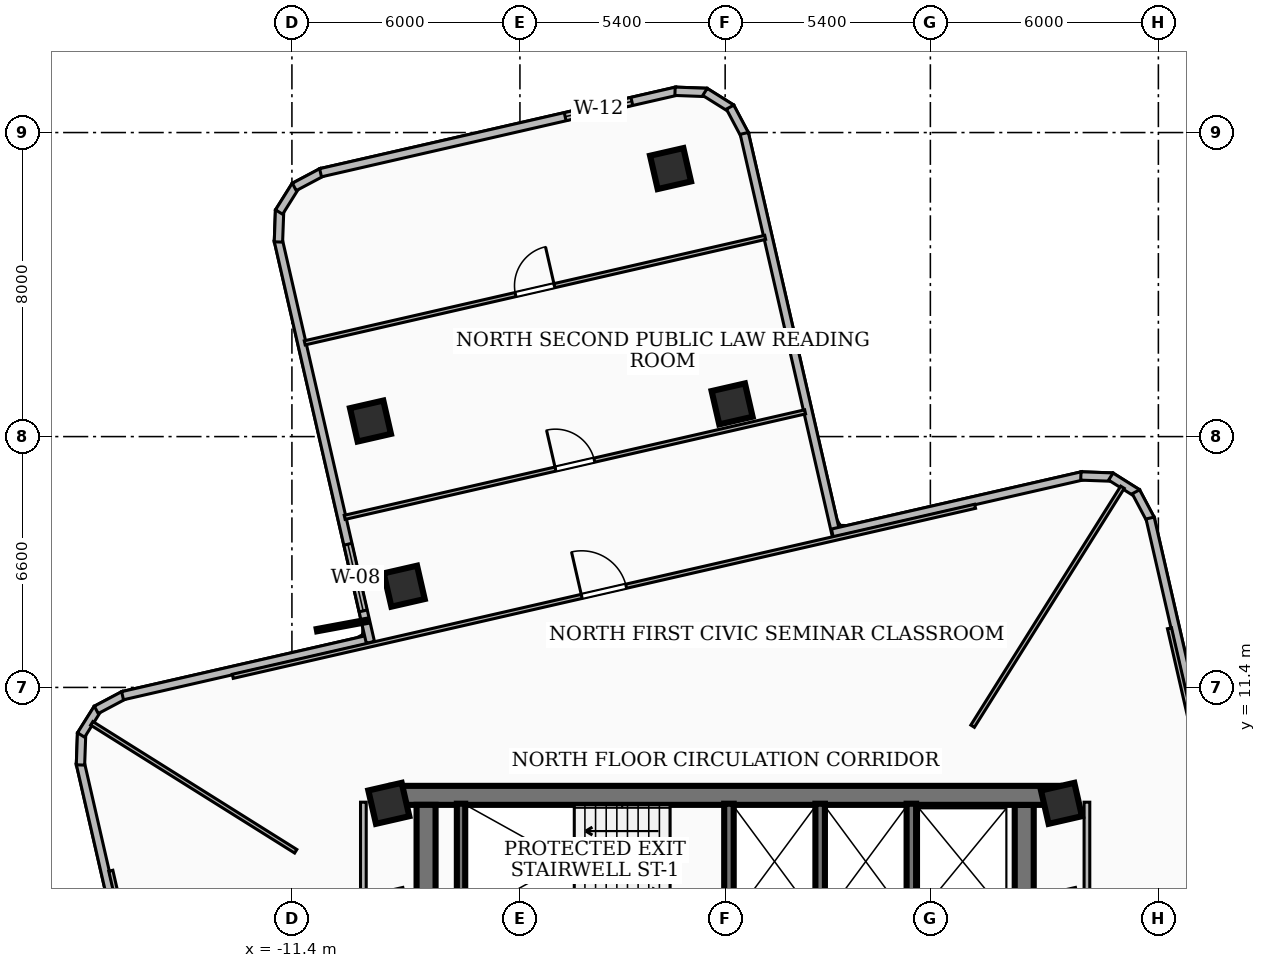
"""IFC4 building model, lengths in metres.
Left out: names, types, materials, properties, quantities, classifications, styles, units other than length and angle.
Written with IfcOpenShell. Run it as: python <this file> out.ifc"""

import sys

from ifc_helpers import new_model, si_unit, direction, frame, frame_2d, origin, origin_2d, place, context, subcontext, project, spatial, rectangle, extrude, element, fill, save


model = new_model("IFC4")
c1 = context("Model", 3, precision=1e-05, world=origin(), true_north=direction((0.0, 1.0)))
c2 = subcontext(c1, "Body", "Model", "MODEL_VIEW")
j1 = project(units=[si_unit("LENGTHUNIT", "METRE"), si_unit("PLANEANGLEUNIT", "RADIAN")], contexts=[c1])
p1 = place(None, origin())
s1 = spatial("IfcSite", under=j1, at=p1, CompositionType="ELEMENT")
p2 = place(p1, origin())
s2 = spatial("IfcBuilding", under=s1, at=p2, CompositionType="ELEMENT")
p3 = place(p2, frame((0.0, 0.0, 116.28)))
s3 = spatial("IfcBuildingStorey", under=s2, at=p3, CompositionType="ELEMENT", Elevation=116.28)
p4 = place(p3, frame((-8.78, 8.56, 0.0), z_axis=(0.0, 0.0, 1.0), x_axis=(1.0, 0.0, 0.0)))
e1 = element("IfcWall", 1, at=p4, inside=s3, PredefinedType="SHEAR", context=c2, shape_type="SweptSolid", body=[
    extrude(rectangle(XDim=17.56, YDim=0.5, at=frame_2d((8.78, 0.0))), origin(), (0.0, 0.0, 1.0), 3.34),
])
for number, where, z_axis, x_axis in (
    (2, (-7.87, 2.0, 0.0), (0.0, 0.0, 1.0), (0.0, 1.0, 0.0)),
    (3, (7.87, 8.31, 0.0), (0.0, 0.0, 1.0), (0.0, -1.0, 0.0)),
):
    element("IfcWall", number, at=place(p3, frame(where, z_axis=z_axis, x_axis=x_axis)), inside=s3, PredefinedType="SHEAR", context=c2, shape_type="SweptSolid", body=[
        extrude(rectangle(XDim=6.31, YDim=0.5, at=frame_2d((3.155, 0.0))), origin(), (0.0, 0.0, 1.0), 3.34),
    ])
p5 = place(p3, frame((-6.95, 5.28, 0.0), z_axis=(0.0, 0.0, 1.0), x_axis=(0.0, 1.0, 0.0)))
e4 = element("IfcWall", 4, at=p5, inside=s3, PredefinedType="SOLIDWALL", context=c2, shape_type="SweptSolid", body=[
    extrude(rectangle(XDim=3.06, YDim=0.22, at=frame_2d((1.53, 0.0))), origin(), (0.0, 0.0, 1.0), 3.34),
])
for number, where, z_axis, x_axis in (
    (5, (0.1, 5.3, 0.0), (0.0, 0.0, 1.0), (0.0, 1.0, 0.0)),
    (6, (2.5, 5.3, 0.0), (0.0, 0.0, 1.0), (0.0, 1.0, 0.0)),
    (7, (4.9, 5.3, 0.0), (0.0, 0.0, 1.0), (0.0, 1.0, 0.0)),
):
    element("IfcWall", number, at=place(p3, frame(where, z_axis=z_axis, x_axis=x_axis)), inside=s3, PredefinedType="SOLIDWALL", context=c2, shape_type="SweptSolid", body=[
        extrude(rectangle(XDim=3.04, YDim=0.25, at=frame_2d((1.52, 0.0))), origin(), (0.0, 0.0, 1.0), 3.34),
    ])
for number, where, z_axis, x_axis in (
    (8, (-8.85, 8.35, 0.0), (0.0, 0.0, 1.0), (0.975, 0.223, 0.0)),
    (9, (8.85, 8.35, 0.0), (0.0, 0.0, 1.0), (0.975, 0.223, 0.0)),
    (10, (0.183, 18.86, 0.0), (0.0, 0.0, 1.0), (0.975, 0.223, 0.0)),
    (11, (-8.445, 14.064, 0.0), (0.0, 0.0, 1.0), (0.975, 0.223, 0.0)),
    (12, (-1.437, 25.052, 0.0), (0.0, 0.0, 1.0), (0.975, 0.223, 0.0)),
    (13, (-9.333, 18.409, 0.0), (0.0, 0.0, 1.0), (0.975, 0.223, 0.0)),
):
    element("IfcColumn", number, at=place(p3, frame(where, z_axis=z_axis, x_axis=x_axis)), inside=s3, PredefinedType="COLUMN", context=c2, shape_type="SweptSolid", body=[
        extrude(rectangle(XDim=0.9, YDim=0.9, at=origin_2d()), origin(), (0.0, 0.0, 1.0), 3.6),
    ])
p6 = place(p3, frame((-15.46, 2.821, 0.0), z_axis=(0.0, 0.0, 1.0), x_axis=(-0.223278912438, 0.974754598481, 0.0)))
e14 = element("IfcWall", 14, at=p6, inside=s3, PredefinedType="SOLIDWALL", context=c2, shape_type="SweptSolid", body=[
    extrude(rectangle(XDim=6.759, YDim=0.22, at=frame_2d((3.379, 0.0))), origin(), (0.0, 0.0, 1.0), 3.34),
])
p7 = place(p3, frame((-16.964, 9.36, 0.0), z_axis=(0.0, 0.0, 1.0), x_axis=(0.035983706773, 0.999352376715, 0.0)))
e15 = element("IfcWall", 15, at=p7, inside=s3, PredefinedType="SOLIDWALL", context=c2, shape_type="SweptSolid", body=[
    extrude(rectangle(XDim=0.834, YDim=0.22, at=frame_2d((0.417, 0.0))), origin(), (0.0, 0.0, 1.0), 3.34),
])
p8 = place(p3, frame((-16.948, 10.148, 0.0), z_axis=(0.0, 0.0, 1.0), x_axis=(0.531096868492, 0.847311109497, 0.0)))
e16 = element("IfcWall", 16, at=p8, inside=s3, PredefinedType="SOLIDWALL", context=c2, shape_type="SweptSolid", body=[
    extrude(rectangle(XDim=0.819, YDim=0.22, at=frame_2d((0.41, 0.0))), origin(), (0.0, 0.0, 1.0), 3.34),
])
p9 = place(p3, frame((-16.548, 10.809, 0.0), z_axis=(0.0, 0.0, 1.0), x_axis=(0.883460266876, 0.468506090516, 0.0)))
e17 = element("IfcWall", 17, at=p9, inside=s3, PredefinedType="SOLIDWALL", context=c2, shape_type="SweptSolid", body=[
    extrude(rectangle(XDim=0.834, YDim=0.22, at=frame_2d((0.417, 0.0))), origin(), (0.0, 0.0, 1.0), 3.34),
])
p10 = place(p3, frame((-15.857, 11.182, 0.0), z_axis=(0.0, 0.0, 1.0), x_axis=(0.974754598481, 0.223278912438, 0.0)))
e18 = element("IfcWall", 18, at=p10, inside=s3, PredefinedType="SOLIDWALL", context=c2, shape_type="SweptSolid", body=[
    extrude(rectangle(XDim=6.759, YDim=0.22, at=frame_2d((3.379, 0.0))), origin(), (0.0, 0.0, 1.0), 3.34),
])
p11 = place(p3, frame((-9.335, 12.585, 0.0), z_axis=(0.0, 0.0, 1.0), x_axis=(-0.22331741435, 0.974745778369, 0.0)))
e19 = element("IfcWall", 19, at=p11, inside=s3, PredefinedType="SOLIDWALL", context=c2, shape_type="SweptSolid", body=[
    extrude(rectangle(XDim=10.859, YDim=0.22, at=frame_2d((5.43, 0.0))), origin(), (0.0, 0.0, 1.0), 3.34),
])
p12 = place(p11, frame((0.85, 0.0, 0.85)))
e20 = element("IfcOpeningElement", 20, at=p12, cuts=e19, PredefinedType="OPENING", context=c2, shape_type="SweptSolid", body=[
    extrude(rectangle(XDim=1.8, YDim=1.8, at=frame_2d((0.9, 0.9))), frame((0.0, 0.12, 0.0), z_axis=(0.0, -1.0, 0.0), x_axis=(1.0, 0.0, 0.0)), (0.0, 0.0, 1.0), 0.24),
])
p13 = place(p3, frame((-11.755, 23.121, 0.0), z_axis=(0.0, 0.0, 1.0), x_axis=(0.036903333482, 0.999318839999, 0.0)))
e21 = element("IfcWall", 21, at=p13, inside=s3, PredefinedType="SOLIDWALL", context=c2, shape_type="SweptSolid", body=[
    extrude(rectangle(XDim=0.833, YDim=0.22, at=frame_2d((0.417, 0.0))), origin(), (0.0, 0.0, 1.0), 3.34),
])
p14 = place(p3, frame((-11.738, 23.908, 0.0), z_axis=(0.0, 0.0, 1.0), x_axis=(0.531096868492, 0.847311109497, 0.0)))
e22 = element("IfcWall", 22, at=p14, inside=s3, PredefinedType="SOLIDWALL", context=c2, shape_type="SweptSolid", body=[
    extrude(rectangle(XDim=0.819, YDim=0.22, at=frame_2d((0.41, 0.0))), origin(), (0.0, 0.0, 1.0), 3.34),
])
p15 = place(p3, frame((-11.338, 24.569, 0.0), z_axis=(0.0, 0.0, 1.0), x_axis=(0.883396009524, 0.468627240307, 0.0)))
e23 = element("IfcWall", 23, at=p15, inside=s3, PredefinedType="SOLIDWALL", context=c2, shape_type="SweptSolid", body=[
    extrude(rectangle(XDim=0.834, YDim=0.22, at=frame_2d((0.417, 0.0))), origin(), (0.0, 0.0, 1.0), 3.34),
])
p16 = place(p3, frame((-10.647, 24.942, 0.0), z_axis=(0.0, 0.0, 1.0), x_axis=(0.974725871537, 0.223404286793, 0.0)))
e24 = element("IfcWall", 24, at=p16, inside=s3, PredefinedType="SOLIDWALL", context=c2, shape_type="SweptSolid", body=[
    extrude(rectangle(XDim=9.62, YDim=0.22, at=frame_2d((4.81, 0.0))), origin(), (0.0, 0.0, 1.0), 3.34),
])
p17 = place(p16, frame((6.604, 0.0, 0.85)))
e25 = element("IfcOpeningElement", 25, at=p17, cuts=e24, PredefinedType="OPENING", context=c2, shape_type="SweptSolid", body=[
    extrude(rectangle(XDim=1.8, YDim=1.6, at=frame_2d((0.9, 0.8))), frame((0.0, 0.12, 0.0), z_axis=(0.0, -1.0, 0.0), x_axis=(1.0, 0.0, 0.0)), (0.0, 0.0, 1.0), 0.24),
])
p18 = place(p3, frame((-1.319, 27.086, 0.0), z_axis=(0.0, 0.0, 1.0), x_axis=(0.999309614288, -0.037152318798, 0.0)))
e26 = element("IfcWall", 26, at=p18, inside=s3, PredefinedType="SOLIDWALL", context=c2, shape_type="SweptSolid", body=[
    extrude(rectangle(XDim=0.834, YDim=0.22, at=frame_2d((0.417, 0.0))), origin(), (0.0, 0.0, 1.0), 3.34),
])
p19 = place(p3, frame((-0.531, 27.069, 0.0), z_axis=(0.0, 0.0, 1.0), x_axis=(0.847311109497, -0.531096868492, 0.0)))
e27 = element("IfcWall", 27, at=p19, inside=s3, PredefinedType="SOLIDWALL", context=c2, shape_type="SweptSolid", body=[
    extrude(rectangle(XDim=0.819, YDim=0.22, at=frame_2d((0.41, 0.0))), origin(), (0.0, 0.0, 1.0), 3.34),
])
p20 = place(p3, frame((0.13, 26.669, 0.0), z_axis=(0.0, 0.0, 1.0), x_axis=(0.468734444521, -0.883339131092, 0.0)))
e28 = element("IfcWall", 28, at=p20, inside=s3, PredefinedType="SOLIDWALL", context=c2, shape_type="SweptSolid", body=[
    extrude(rectangle(XDim=0.834, YDim=0.22, at=frame_2d((0.417, 0.0))), origin(), (0.0, 0.0, 1.0), 3.34),
])
p21 = place(p3, frame((0.503, 25.978, 0.0), z_axis=(0.0, 0.0, 1.0), x_axis=(0.223251537739, -0.974760868571, 0.0)))
e29 = element("IfcWall", 29, at=p21, inside=s3, PredefinedType="SOLIDWALL", context=c2, shape_type="SweptSolid", body=[
    extrude(rectangle(XDim=10.858, YDim=0.22, at=frame_2d((5.429, 0.0))), origin(), (0.0, 0.0, 1.0), 2.57),
])
p22 = place(p3, frame((2.821, 15.46, 0.0), z_axis=(0.0, 0.0, 1.0), x_axis=(0.974754598481, 0.223278912438, 0.0)))
e30 = element("IfcWall", 30, at=p22, inside=s3, PredefinedType="SOLIDWALL", context=c2, shape_type="SweptSolid", body=[
    extrude(rectangle(XDim=6.759, YDim=0.22, at=frame_2d((3.379, 0.0))), origin(), (0.0, 0.0, 1.0), 2.57),
])
p23 = place(p3, frame((9.36, 16.964, 0.0), z_axis=(0.0, 0.0, 1.0), x_axis=(0.999352376715, -0.035983706773, 0.0)))
e31 = element("IfcWall", 31, at=p23, inside=s3, PredefinedType="SOLIDWALL", context=c2, shape_type="SweptSolid", body=[
    extrude(rectangle(XDim=0.834, YDim=0.22, at=frame_2d((0.417, 0.0))), origin(), (0.0, 0.0, 1.0), 3.34),
])
p24 = place(p3, frame((10.148, 16.948, 0.0), z_axis=(0.0, 0.0, 1.0), x_axis=(0.847311109497, -0.531096868492, 0.0)))
e32 = element("IfcWall", 32, at=p24, inside=s3, PredefinedType="SOLIDWALL", context=c2, shape_type="SweptSolid", body=[
    extrude(rectangle(XDim=0.819, YDim=0.22, at=frame_2d((0.41, 0.0))), origin(), (0.0, 0.0, 1.0), 3.34),
])
p25 = place(p3, frame((10.809, 16.548, 0.0), z_axis=(0.0, 0.0, 1.0), x_axis=(0.468506090516, -0.883460266876, 0.0)))
e33 = element("IfcWall", 33, at=p25, inside=s3, PredefinedType="SOLIDWALL", context=c2, shape_type="SweptSolid", body=[
    extrude(rectangle(XDim=0.834, YDim=0.22, at=frame_2d((0.417, 0.0))), origin(), (0.0, 0.0, 1.0), 3.34),
])
p26 = place(p3, frame((11.182, 15.857, 0.0), z_axis=(0.0, 0.0, 1.0), x_axis=(0.223278912438, -0.974754598481, 0.0)))
e34 = element("IfcWall", 34, at=p26, inside=s3, PredefinedType="SOLIDWALL", context=c2, shape_type="SweptSolid", body=[
    extrude(rectangle(XDim=6.759, YDim=0.22, at=frame_2d((3.379, 0.0))), origin(), (0.0, 0.0, 1.0), 3.34),
])
for number, where, z_axis, x_axis in (
    (35, (-9.52, 1.75, 0.0), (0.0, 0.0, 1.0), (0.0, 1.0, 0.0)),
    (36, (9.52, 1.75, 0.0), (0.0, 0.0, 1.0), (0.0, 1.0, 0.0)),
):
    element("IfcWall", number, at=place(p3, frame(where, z_axis=z_axis, x_axis=x_axis)), inside=s3, PredefinedType="PARTITIONING", context=c2, shape_type="SweptSolid", body=[
        extrude(rectangle(XDim=6.63, YDim=0.15, at=frame_2d((3.315, 0.0))), origin(), (0.0, 0.0, 1.0), 2.57),
    ])
p27 = place(p3, frame((6.512, 10.38, 0.0), z_axis=(0.0, 0.0, 1.0), x_axis=(0.531323053356, 0.847169294163, 0.0)))
e37 = element("IfcWall", 37, at=p27, inside=s3, PredefinedType="PARTITIONING", context=c2, shape_type="SweptSolid", body=[
    extrude(rectangle(XDim=7.421, YDim=0.11, at=frame_2d((3.711, 0.0))), origin(), (0.0, 0.0, 1.0), 2.57),
])
p28 = place(p3, frame((-11.3, 7.089, 0.0), z_axis=(0.0, 0.0, 1.0), x_axis=(-0.847172398776, 0.531318103167, 0.0)))
e38 = element("IfcWall", 38, at=p28, inside=s3, PredefinedType="PARTITIONING", context=c2, shape_type="SweptSolid", body=[
    extrude(rectangle(XDim=6.335, YDim=0.11, at=frame_2d((3.167, 0.0))), origin(), (0.0, 0.0, 1.0), 3.34),
])
p29 = place(p3, frame((11.692, 12.957, 0.0), z_axis=(0.0, 0.0, 1.0), x_axis=(0.223262093598, -0.97475845088, 0.0)))
e39 = element("IfcWall", 39, at=p29, inside=s3, PredefinedType="PARTITIONING", context=c2, shape_type="SweptSolid", body=[
    extrude(rectangle(XDim=20.04, YDim=0.11, at=frame_2d((10.02, 0.0))), origin(), (0.0, 0.0, 1.0), 2.57),
])
p30 = place(p29, frame((9.42, 0.0, 0.0)))
e40 = element("IfcOpeningElement", 40, at=p30, cuts=e39, PredefinedType="OPENING", context=c2, shape_type="SweptSolid", body=[
    extrude(rectangle(XDim=1.2, YDim=2.1, at=frame_2d((0.6, 1.05))), frame((0.0, 0.065, 0.0), z_axis=(0.0, -1.0, 0.0), x_axis=(1.0, 0.0, 0.0)), (0.0, 0.0, 1.0), 0.13),
])
p31 = place(p3, frame((-12.957, 11.692, 0.0), z_axis=(0.0, 0.0, 1.0), x_axis=(0.97475845088, 0.223262093598, 0.0)))
e41 = element("IfcWall", 41, at=p31, inside=s3, PredefinedType="PARTITIONING", context=c2, shape_type="SweptSolid", body=[
    extrude(rectangle(XDim=20.04, YDim=0.11, at=frame_2d((10.02, 0.0))), origin(), (0.0, 0.0, 1.0), 2.57),
])
p32 = place(p31, frame((9.42, 0.0, 0.0)))
e42 = element("IfcOpeningElement", 42, at=p32, cuts=e41, PredefinedType="OPENING", context=c2, shape_type="SweptSolid", body=[
    extrude(rectangle(XDim=1.2, YDim=2.1, at=frame_2d((0.6, 1.05))), frame((0.0, 0.065, 0.0), z_axis=(0.0, -1.0, 0.0), x_axis=(1.0, 0.0, 0.0)), (0.0, 0.0, 1.0), 0.13),
])
p33 = place(p3, frame((-10.012, 15.875, 0.0), z_axis=(0.0, 0.0, 1.0), x_axis=(0.974744523099, 0.223322893337, 0.0)))
e43 = element("IfcWall", 43, at=p33, inside=s3, PredefinedType="PARTITIONING", context=c2, shape_type="SweptSolid", body=[
    extrude(rectangle(XDim=12.43, YDim=0.11, at=frame_2d((6.215, 0.0))), origin(), (0.0, 0.0, 1.0), 2.57),
])
p34 = place(p33, frame((5.69, 0.0, 0.0)))
e44 = element("IfcOpeningElement", 44, at=p34, cuts=e43, PredefinedType="OPENING", context=c2, shape_type="SweptSolid", body=[
    extrude(rectangle(XDim=1.05, YDim=2.08, at=frame_2d((0.525, 1.04))), frame((0.0, 0.065, 0.0), z_axis=(0.0, -1.0, 0.0), x_axis=(1.0, 0.0, 0.0)), (0.0, 0.0, 1.0), 0.13),
])
p35 = place(p3, frame((-11.063, 20.466, 0.0), z_axis=(0.0, 0.0, 1.0), x_axis=(0.974744523099, 0.223322893337, 0.0)))
e45 = element("IfcWall", 45, at=p35, inside=s3, PredefinedType="PARTITIONING", context=c2, shape_type="SweptSolid", body=[
    extrude(rectangle(XDim=12.43, YDim=0.11, at=frame_2d((6.215, 0.0))), origin(), (0.0, 0.0, 1.0), 2.57),
])
p36 = place(p35, frame((5.69, 0.0, 0.0)))
e46 = element("IfcOpeningElement", 46, at=p36, cuts=e45, PredefinedType="OPENING", context=c2, shape_type="SweptSolid", body=[
    extrude(rectangle(XDim=1.05, YDim=2.08, at=frame_2d((0.525, 1.04))), frame((0.0, 0.065, 0.0), z_axis=(0.0, -1.0, 0.0), x_axis=(1.0, 0.0, 0.0)), (0.0, 0.0, 1.0), 0.13),
])
p37 = place(p3, frame((-11.692, -12.957, 0.0), z_axis=(0.0, 0.0, 1.0), x_axis=(-0.223262093598, 0.97475845088, 0.0)))
e47 = element("IfcWall", 47, at=p37, inside=s3, PredefinedType="PARTITIONING", context=c2, shape_type="SweptSolid", body=[
    extrude(rectangle(XDim=20.04, YDim=0.11, at=frame_2d((10.02, 0.0))), origin(), (0.0, 0.0, 1.0), 2.57),
])
p38 = place(p37, frame((9.42, 0.0, 0.0)))
e48 = element("IfcOpeningElement", 48, at=p38, cuts=e47, PredefinedType="OPENING", context=c2, shape_type="SweptSolid", body=[
    extrude(rectangle(XDim=1.2, YDim=2.1, at=frame_2d((0.6, 1.05))), frame((0.0, 0.065, 0.0), z_axis=(0.0, -1.0, 0.0), x_axis=(1.0, 0.0, 0.0)), (0.0, 0.0, 1.0), 0.13),
])
p39 = place(p12, origin())
e49 = element("IfcWindow", 49, at=p39, inside=s3, PartitioningType="SINGLE_PANEL", PredefinedType="WINDOW", context=c2, shape_type="SweptSolid", body=[
    extrude(rectangle(XDim=1.8, YDim=1.8, at=frame_2d((0.9, 0.9))), frame((0.0, 0.03, 0.0), z_axis=(0.0, -1.0, 0.0), x_axis=(1.0, 0.0, 0.0)), (0.0, 0.0, 1.0), 0.06),
])
fill(e20, e49)
p40 = place(p17, origin())
e50 = element("IfcWindow", 50, at=p40, inside=s3, PartitioningType="SINGLE_PANEL", PredefinedType="WINDOW", context=c2, shape_type="SweptSolid", body=[
    extrude(rectangle(XDim=1.8, YDim=1.6, at=frame_2d((0.9, 0.8))), frame((0.0, 0.03, 0.0), z_axis=(0.0, -1.0, 0.0), x_axis=(1.0, 0.0, 0.0)), (0.0, 0.0, 1.0), 0.06),
])
fill(e25, e50)
p41 = place(p32, origin())
e51 = element("IfcDoor", 51, at=p41, inside=s3, OperationType="SINGLE_SWING_LEFT", PredefinedType="DOOR", context=c2, shape_type="SweptSolid", body=[
    extrude(rectangle(XDim=1.2, YDim=2.1, at=frame_2d((0.6, 1.05))), frame((0.0, 0.025, 0.0), z_axis=(0.0, -1.0, 0.0), x_axis=(1.0, 0.0, 0.0)), (0.0, 0.0, 1.0), 0.05),
])
fill(e42, e51)
p42 = place(p34, origin())
e52 = element("IfcDoor", 52, at=p42, inside=s3, OperationType="SINGLE_SWING_LEFT", PredefinedType="DOOR", context=c2, shape_type="SweptSolid", body=[
    extrude(rectangle(XDim=1.05, YDim=2.08, at=frame_2d((0.525, 1.04))), frame((0.0, 0.025, 0.0), z_axis=(0.0, -1.0, 0.0), x_axis=(1.0, 0.0, 0.0)), (0.0, 0.0, 1.0), 0.05),
])
fill(e44, e52)
p43 = place(p36, origin())
e53 = element("IfcDoor", 53, at=p43, inside=s3, OperationType="SINGLE_SWING_RIGHT", PredefinedType="DOOR", context=c2, shape_type="SweptSolid", body=[
    extrude(rectangle(XDim=1.05, YDim=2.08, at=frame_2d((0.525, 1.04))), frame((0.0, 0.025, 0.0), z_axis=(0.0, -1.0, 0.0), x_axis=(1.0, 0.0, 0.0)), (0.0, 0.0, 1.0), 0.05),
])
fill(e46, e53)
save(model, sys.argv[1])
